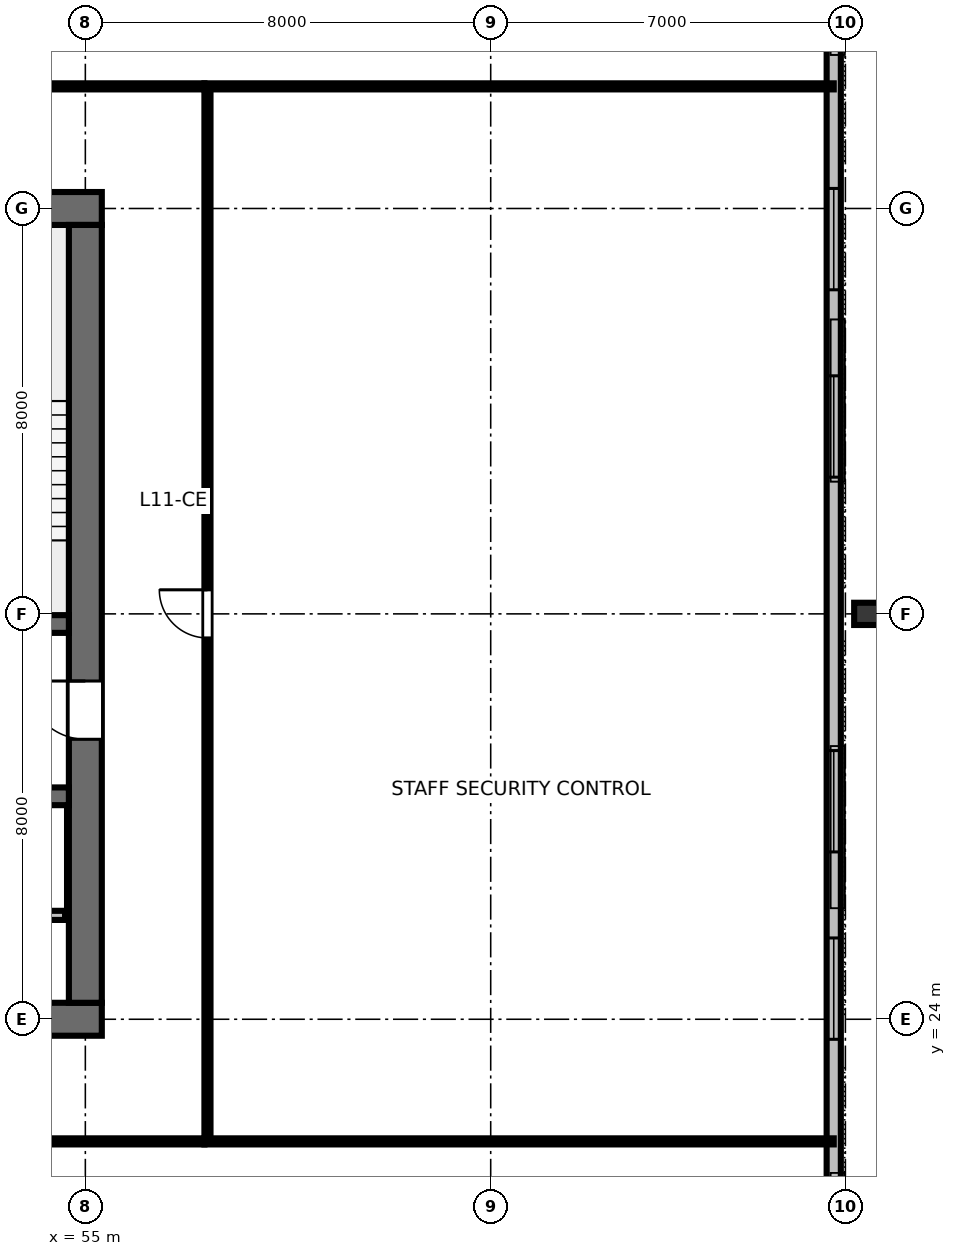
"""IFC4 building model, lengths in metres.
Left out: names, types, materials, properties, quantities, classifications, styles, units other than length and angle.
Written with IfcOpenShell. Run it as: python <this file> out.ifc"""

import sys

from ifc_helpers import new_model, si_unit, direction, frame, frame_2d, origin, origin_2d, place, context, subcontext, project, spatial, rectangle, i_section, extrude, element, fill, save


model = new_model("IFC4")
c1 = context("Model", 3, precision=1e-05, world=origin(), true_north=direction((0.0, 1.0)))
c2 = subcontext(c1, "Body", "Model", "MODEL_VIEW")
j1 = project(units=[si_unit("LENGTHUNIT", "METRE"), si_unit("PLANEANGLEUNIT", "RADIAN")], contexts=[c1])
p1 = place(None, origin())
s1 = spatial("IfcSite", under=j1, at=p1, CompositionType="ELEMENT")
p2 = place(p1, origin())
s2 = spatial("IfcBuilding", under=s1, at=p2, CompositionType="ELEMENT")
p3 = place(p2, frame((0.0, 0.0, 46.0)))
s3 = spatial("IfcBuildingStorey", under=s2, at=p3, CompositionType="ELEMENT", Elevation=46.0)
p4 = place(p3, frame((36.675, 24.0, 0.0), z_axis=(0.0, 0.0, 1.0), x_axis=(1.0, 0.0, 0.0)))
e1 = element("IfcWall", 1, at=p4, inside=s3, PredefinedType="SHEAR", context=c2, shape_type="SweptSolid", body=[
    extrude(rectangle(XDim=18.65, YDim=0.65, at=frame_2d((9.325, 0.0))), origin(), (0.0, 0.0, 1.0), 3.36),
])
p5 = place(p4, frame((5.725, 0.0, 0.0)))
e2 = element("IfcOpeningElement", 2, at=p5, cuts=e1, PredefinedType="OPENING", context=c2, shape_type="SweptSolid", body=[
    extrude(rectangle(XDim=1.6, YDim=2.15, at=frame_2d((0.8, 1.075))), frame((0.0, 0.335, 0.0), z_axis=(0.0, -1.0, 0.0), x_axis=(1.0, 0.0, 0.0)), (0.0, 0.0, 1.0), 0.67),
])
p6 = place(p4, frame((12.125, 0.0, 0.0)))
e3 = element("IfcOpeningElement", 3, at=p6, cuts=e1, PredefinedType="OPENING", context=c2, shape_type="SweptSolid", body=[
    extrude(rectangle(XDim=1.6, YDim=2.15, at=frame_2d((0.8, 1.075))), frame((0.0, 0.335, 0.0), z_axis=(0.0, -1.0, 0.0), x_axis=(1.0, 0.0, 0.0)), (0.0, 0.0, 1.0), 0.67),
])
p7 = place(p3, frame((36.675, 40.0, 0.0), z_axis=(0.0, 0.0, 1.0), x_axis=(1.0, 0.0, 0.0)))
e4 = element("IfcWall", 4, at=p7, inside=s3, PredefinedType="SHEAR", context=c2, shape_type="SweptSolid", body=[
    extrude(rectangle(XDim=18.65, YDim=0.65, at=frame_2d((9.325, 0.0))), origin(), (0.0, 0.0, 1.0), 3.36),
])
p8 = place(p7, frame((10.625, 0.0, 0.0)))
e5 = element("IfcOpeningElement", 5, at=p8, cuts=e4, PredefinedType="OPENING", context=c2, shape_type="SweptSolid", body=[
    extrude(rectangle(XDim=1.0, YDim=2.15, at=frame_2d((0.5, 1.075))), frame((0.0, 0.335, 0.0), z_axis=(0.0, -1.0, 0.0), x_axis=(1.0, 0.0, 0.0)), (0.0, 0.0, 1.0), 0.67),
])
p9 = place(p3, frame((55.0, 24.325, 0.0), z_axis=(0.0, 0.0, 1.0), x_axis=(0.0, 1.0, 0.0)))
e6 = element("IfcWall", 6, at=p9, inside=s3, PredefinedType="SHEAR", context=c2, shape_type="SweptSolid", body=[
    extrude(rectangle(XDim=15.35, YDim=0.65, at=frame_2d((7.675, 0.0))), origin(), (0.0, 0.0, 1.0), 3.36),
])
p10 = place(p9, frame((5.2, 0.0, 0.0)))
e7 = element("IfcOpeningElement", 7, at=p10, cuts=e6, PredefinedType="OPENING", context=c2, shape_type="SweptSolid", body=[
    extrude(rectangle(XDim=1.15, YDim=2.15, at=frame_2d((0.575, 1.075))), frame((0.0, 0.335, 0.0), z_axis=(0.0, -1.0, 0.0), x_axis=(1.0, 0.0, 0.0)), (0.0, 0.0, 1.0), 0.67),
])
p11 = place(p3, frame((37.325, 31.8, 0.0), z_axis=(0.0, 0.0, 1.0), x_axis=(1.0, 0.0, 0.0)))
e8 = element("IfcWall", 8, at=p11, inside=s3, PredefinedType="SHEAR", context=c2, shape_type="SweptSolid", body=[
    extrude(rectangle(XDim=17.35, YDim=0.35, at=frame_2d((8.675, 0.0))), origin(), (0.0, 0.0, 1.0), 3.36),
])
p12 = place(p11, frame((0.725, 0.0, 0.0)))
e9 = element("IfcOpeningElement", 9, at=p12, cuts=e8, PredefinedType="OPENING", context=c2, shape_type="SweptSolid", body=[
    extrude(rectangle(XDim=1.1, YDim=2.15, at=frame_2d((0.55, 1.075))), frame((0.0, 0.185, 0.0), z_axis=(0.0, -1.0, 0.0), x_axis=(1.0, 0.0, 0.0)), (0.0, 0.0, 1.0), 0.37),
])
p13 = place(p11, frame((14.625, 0.0, 0.0)))
e10 = element("IfcOpeningElement", 10, at=p13, cuts=e8, PredefinedType="OPENING", context=c2, shape_type="SweptSolid", body=[
    extrude(rectangle(XDim=1.1, YDim=2.15, at=frame_2d((0.55, 1.075))), frame((0.0, 0.185, 0.0), z_axis=(0.0, -1.0, 0.0), x_axis=(1.0, 0.0, 0.0)), (0.0, 0.0, 1.0), 0.37),
])
p14 = place(p3, frame((37.325, 28.4, 0.0), z_axis=(0.0, 0.0, 1.0), x_axis=(1.0, 0.0, 0.0)))
e11 = element("IfcWall", 11, at=p14, inside=s3, PredefinedType="SHEAR", context=c2, shape_type="SweptSolid", body=[
    extrude(rectangle(XDim=17.35, YDim=0.35, at=frame_2d((8.675, 0.0))), origin(), (0.0, 0.0, 1.0), 3.36),
])
p15 = place(p3, frame((70.43, 32.0, 0.0), z_axis=(0.110533045798, 0.0, 0.993872449455), x_axis=(-0.993872449455, 0.0, 0.110533045798)))
e12 = element("IfcColumn", 12, at=p15, inside=s3, PredefinedType="COLUMN", context=c2, shape_type="SweptSolid", body=[
    extrude(i_section(OverallWidth=0.439, OverallDepth=0.514, WebThickness=0.06, FlangeThickness=0.097, FilletRadius=0.025, at=origin_2d()), origin(), (0.0, 0.0, 1.0), 3.167),
])
p16 = place(p3, frame((69.77, 14.26, 0.0), z_axis=(0.0, 0.0, 1.0), x_axis=(0.0, 1.0, 0.0)))
e13 = element("IfcWall", 13, at=p16, inside=s3, PredefinedType="STANDARD", context=c2, shape_type="SweptSolid", body=[
    extrude(rectangle(XDim=35.48, YDim=0.28, at=frame_2d((17.74, 0.0))), origin(), (0.0, 0.0, 1.0), 3.15),
])
p17 = place(p16, frame((1.949, 0.0, 0.8)))
e14 = element("IfcOpeningElement", 14, at=p17, cuts=e13, PredefinedType="OPENING", context=c2, shape_type="SweptSolid", body=[
    extrude(rectangle(XDim=2.0, YDim=1.95, at=frame_2d((1.0, 0.975))), frame((0.0, 0.15, 0.0), z_axis=(0.0, -1.0, 0.0), x_axis=(1.0, 0.0, 0.0)), (0.0, 0.0, 1.0), 0.3),
])
p18 = place(p16, frame((9.344, 0.0, 0.8)))
e15 = element("IfcOpeningElement", 15, at=p18, cuts=e13, PredefinedType="OPENING", context=c2, shape_type="SweptSolid", body=[
    extrude(rectangle(XDim=2.0, YDim=1.95, at=frame_2d((1.0, 0.975))), frame((0.0, 0.15, 0.0), z_axis=(0.0, -1.0, 0.0), x_axis=(1.0, 0.0, 0.0)), (0.0, 0.0, 1.0), 0.3),
])
p19 = place(p16, frame((13.042, 0.0, 0.8)))
e16 = element("IfcOpeningElement", 16, at=p19, cuts=e13, PredefinedType="OPENING", context=c2, shape_type="SweptSolid", body=[
    extrude(rectangle(XDim=2.0, YDim=1.95, at=frame_2d((1.0, 0.975))), frame((0.0, 0.15, 0.0), z_axis=(0.0, -1.0, 0.0), x_axis=(1.0, 0.0, 0.0)), (0.0, 0.0, 1.0), 0.3),
])
p20 = place(p16, frame((20.438, 0.0, 0.8)))
e17 = element("IfcOpeningElement", 17, at=p20, cuts=e13, PredefinedType="OPENING", context=c2, shape_type="SweptSolid", body=[
    extrude(rectangle(XDim=2.0, YDim=1.95, at=frame_2d((1.0, 0.975))), frame((0.0, 0.15, 0.0), z_axis=(0.0, -1.0, 0.0), x_axis=(1.0, 0.0, 0.0)), (0.0, 0.0, 1.0), 0.3),
])
p21 = place(p16, frame((24.135, 0.0, 0.8)))
e18 = element("IfcOpeningElement", 18, at=p21, cuts=e13, PredefinedType="OPENING", context=c2, shape_type="SweptSolid", body=[
    extrude(rectangle(XDim=2.0, YDim=1.95, at=frame_2d((1.0, 0.975))), frame((0.0, 0.15, 0.0), z_axis=(0.0, -1.0, 0.0), x_axis=(1.0, 0.0, 0.0)), (0.0, 0.0, 1.0), 0.3),
])
p22 = place(p16, frame((31.531, 0.0, 0.8)))
e19 = element("IfcOpeningElement", 19, at=p22, cuts=e13, PredefinedType="OPENING", context=c2, shape_type="SweptSolid", body=[
    extrude(rectangle(XDim=2.0, YDim=1.95, at=frame_2d((1.0, 0.975))), frame((0.0, 0.15, 0.0), z_axis=(0.0, -1.0, 0.0), x_axis=(1.0, 0.0, 0.0)), (0.0, 0.0, 1.0), 0.3),
])
p23 = place(p3, frame((37.4, 26.05, 0.0), z_axis=(0.0, 0.0, 1.0), x_axis=(1.0, 0.0, 0.0)))
e20 = element("IfcWall", 20, at=p23, inside=s3, PredefinedType="PARTITIONING", context=c2, shape_type="SweptSolid", body=[
    extrude(rectangle(XDim=17.2, YDim=0.18, at=frame_2d((8.6, 0.0))), origin(), (0.0, 0.0, 1.0), 3.15),
])
p24 = place(p23, frame((1.1, 0.0, 0.0)))
e21 = element("IfcOpeningElement", 21, at=p24, cuts=e20, PredefinedType="OPENING", context=c2, shape_type="SweptSolid", body=[
    extrude(rectangle(XDim=1.05, YDim=2.15, at=frame_2d((0.525, 1.075))), frame((0.0, 0.1, 0.0), z_axis=(0.0, -1.0, 0.0), x_axis=(1.0, 0.0, 0.0)), (0.0, 0.0, 1.0), 0.2),
])
p25 = place(p23, frame((3.0, 0.0, 0.0)))
e22 = element("IfcOpeningElement", 22, at=p25, cuts=e20, PredefinedType="OPENING", context=c2, shape_type="SweptSolid", body=[
    extrude(rectangle(XDim=1.05, YDim=2.15, at=frame_2d((0.525, 1.075))), frame((0.0, 0.1, 0.0), z_axis=(0.0, -1.0, 0.0), x_axis=(1.0, 0.0, 0.0)), (0.0, 0.0, 1.0), 0.2),
])
p26 = place(p3, frame((34.65, 21.59, 0.0), z_axis=(0.0, 0.0, 1.0), x_axis=(1.0, 0.0, 0.0)))
e23 = element("IfcWall", 23, at=p26, inside=s3, PredefinedType="PARTITIONING", context=c2, shape_type="SweptSolid", body=[
    extrude(rectangle(XDim=22.7, YDim=0.12, at=frame_2d((11.35, 0.0))), origin(), (0.0, 0.0, 1.0), 2.43),
])
p27 = place(p26, frame((2.959, 0.0, 0.0)))
e24 = element("IfcOpeningElement", 24, at=p27, cuts=e23, PredefinedType="OPENING", context=c2, shape_type="SweptSolid", body=[
    extrude(rectangle(XDim=0.95, YDim=2.15, at=frame_2d((0.475, 1.075))), frame((0.0, 0.07, 0.0), z_axis=(0.0, -1.0, 0.0), x_axis=(1.0, 0.0, 0.0)), (0.0, 0.0, 1.0), 0.14),
])
p28 = place(p26, frame((7.709, 0.0, 0.0)))
e25 = element("IfcOpeningElement", 25, at=p28, cuts=e23, PredefinedType="OPENING", context=c2, shape_type="SweptSolid", body=[
    extrude(rectangle(XDim=0.95, YDim=2.15, at=frame_2d((0.475, 1.075))), frame((0.0, 0.07, 0.0), z_axis=(0.0, -1.0, 0.0), x_axis=(1.0, 0.0, 0.0)), (0.0, 0.0, 1.0), 0.14),
])
p29 = place(p26, frame((11.204, 0.0, 0.0)))
e26 = element("IfcOpeningElement", 26, at=p29, cuts=e23, PredefinedType="OPENING", context=c2, shape_type="SweptSolid", body=[
    extrude(rectangle(XDim=0.95, YDim=2.15, at=frame_2d((0.475, 1.075))), frame((0.0, 0.07, 0.0), z_axis=(0.0, -1.0, 0.0), x_axis=(1.0, 0.0, 0.0)), (0.0, 0.0, 1.0), 0.14),
])
p30 = place(p26, frame((17.665, 0.0, 0.0)))
e27 = element("IfcOpeningElement", 27, at=p30, cuts=e23, PredefinedType="OPENING", context=c2, shape_type="SweptSolid", body=[
    extrude(rectangle(XDim=0.95, YDim=2.15, at=frame_2d((0.475, 1.075))), frame((0.0, 0.07, 0.0), z_axis=(0.0, -1.0, 0.0), x_axis=(1.0, 0.0, 0.0)), (0.0, 0.0, 1.0), 0.14),
])
p31 = place(p3, frame((34.65, 42.41, 0.0), z_axis=(0.0, 0.0, 1.0), x_axis=(1.0, 0.0, 0.0)))
e28 = element("IfcWall", 28, at=p31, inside=s3, PredefinedType="PARTITIONING", context=c2, shape_type="SweptSolid", body=[
    extrude(rectangle(XDim=22.7, YDim=0.12, at=frame_2d((11.35, 0.0))), origin(), (0.0, 0.0, 1.0), 2.43),
])
p32 = place(p31, frame((10.875, 0.0, 0.0)))
e29 = element("IfcOpeningElement", 29, at=p32, cuts=e28, PredefinedType="OPENING", context=c2, shape_type="SweptSolid", body=[
    extrude(rectangle(XDim=0.95, YDim=2.15, at=frame_2d((0.475, 1.075))), frame((0.0, 0.07, 0.0), z_axis=(0.0, -1.0, 0.0), x_axis=(1.0, 0.0, 0.0)), (0.0, 0.0, 1.0), 0.14),
])
p33 = place(p3, frame((57.41, 21.65, 0.0), z_axis=(0.0, 0.0, 1.0), x_axis=(0.0, 1.0, 0.0)))
e30 = element("IfcWall", 30, at=p33, inside=s3, PredefinedType="PARTITIONING", context=c2, shape_type="SweptSolid", body=[
    extrude(rectangle(XDim=20.7, YDim=0.12, at=frame_2d((10.35, 0.0))), origin(), (0.0, 0.0, 1.0), 2.43),
])
p34 = place(p33, frame((9.875, 0.0, 0.0)))
e31 = element("IfcOpeningElement", 31, at=p34, cuts=e30, PredefinedType="OPENING", context=c2, shape_type="SweptSolid", body=[
    extrude(rectangle(XDim=0.95, YDim=2.15, at=frame_2d((0.475, 1.075))), frame((0.0, 0.07, 0.0), z_axis=(0.0, -1.0, 0.0), x_axis=(1.0, 0.0, 0.0)), (0.0, 0.0, 1.0), 0.14),
])
for number, where, z_axis, x_axis in (
    (32, (57.35, 21.59, 0.0), (0.0, 0.0, 1.0), (1.0, 0.0, 0.0)),
    (33, (57.35, 42.41, 0.0), (0.0, 0.0, 1.0), (1.0, 0.0, 0.0)),
):
    element("IfcWall", number, at=place(p3, frame(where, z_axis=z_axis, x_axis=x_axis)), inside=s3, PredefinedType="PARTITIONING", context=c2, shape_type="SweptSolid", body=[
        extrude(rectangle(XDim=12.42, YDim=0.12, at=frame_2d((6.21, 0.0))), origin(), (0.0, 0.0, 1.0), 2.43),
    ])
p35 = place(p18, origin())
e34 = element("IfcWindow", 34, at=p35, inside=s3, PartitioningType="SINGLE_PANEL", PredefinedType="WINDOW", context=c2, shape_type="SweptSolid", body=[
    extrude(rectangle(XDim=2.0, YDim=1.95, at=frame_2d((1.0, 0.975))), frame((0.0, 0.03, 0.0), z_axis=(0.0, -1.0, 0.0), x_axis=(1.0, 0.0, 0.0)), (0.0, 0.0, 1.0), 0.06),
])
fill(e15, e34)
p36 = place(p19, origin())
e35 = element("IfcWindow", 35, at=p36, inside=s3, PartitioningType="SINGLE_PANEL", PredefinedType="WINDOW", context=c2, shape_type="SweptSolid", body=[
    extrude(rectangle(XDim=2.0, YDim=1.95, at=frame_2d((1.0, 0.975))), frame((0.0, 0.03, 0.0), z_axis=(0.0, -1.0, 0.0), x_axis=(1.0, 0.0, 0.0)), (0.0, 0.0, 1.0), 0.06),
])
fill(e16, e35)
p37 = place(p20, origin())
e36 = element("IfcWindow", 36, at=p37, inside=s3, PartitioningType="SINGLE_PANEL", PredefinedType="WINDOW", context=c2, shape_type="SweptSolid", body=[
    extrude(rectangle(XDim=2.0, YDim=1.95, at=frame_2d((1.0, 0.975))), frame((0.0, 0.03, 0.0), z_axis=(0.0, -1.0, 0.0), x_axis=(1.0, 0.0, 0.0)), (0.0, 0.0, 1.0), 0.06),
])
fill(e17, e36)
p38 = place(p21, origin())
e37 = element("IfcWindow", 37, at=p38, inside=s3, PartitioningType="SINGLE_PANEL", PredefinedType="WINDOW", context=c2, shape_type="SweptSolid", body=[
    extrude(rectangle(XDim=2.0, YDim=1.95, at=frame_2d((1.0, 0.975))), frame((0.0, 0.03, 0.0), z_axis=(0.0, -1.0, 0.0), x_axis=(1.0, 0.0, 0.0)), (0.0, 0.0, 1.0), 0.06),
])
fill(e18, e37)
p39 = place(p10, origin())
e38 = element("IfcDoor", 38, at=p39, inside=s3, OperationType="SINGLE_SWING_RIGHT", PredefinedType="DOOR", context=c2, shape_type="SweptSolid", body=[
    extrude(rectangle(XDim=1.15, YDim=2.15, at=frame_2d((0.575, 1.075))), frame((0.0, 0.025, 0.0), z_axis=(0.0, -1.0, 0.0), x_axis=(1.0, 0.0, 0.0)), (0.0, 0.0, 1.0), 0.05),
])
fill(e7, e38)
p40 = place(p34, origin())
e39 = element("IfcDoor", 39, at=p40, inside=s3, OperationType="SINGLE_SWING_RIGHT", PredefinedType="DOOR", context=c2, shape_type="SweptSolid", body=[
    extrude(rectangle(XDim=0.95, YDim=2.15, at=frame_2d((0.475, 1.075))), frame((0.0, 0.025, 0.0), z_axis=(0.0, -1.0, 0.0), x_axis=(1.0, 0.0, 0.0)), (0.0, 0.0, 1.0), 0.05),
])
fill(e31, e39)
save(model, sys.argv[1])
